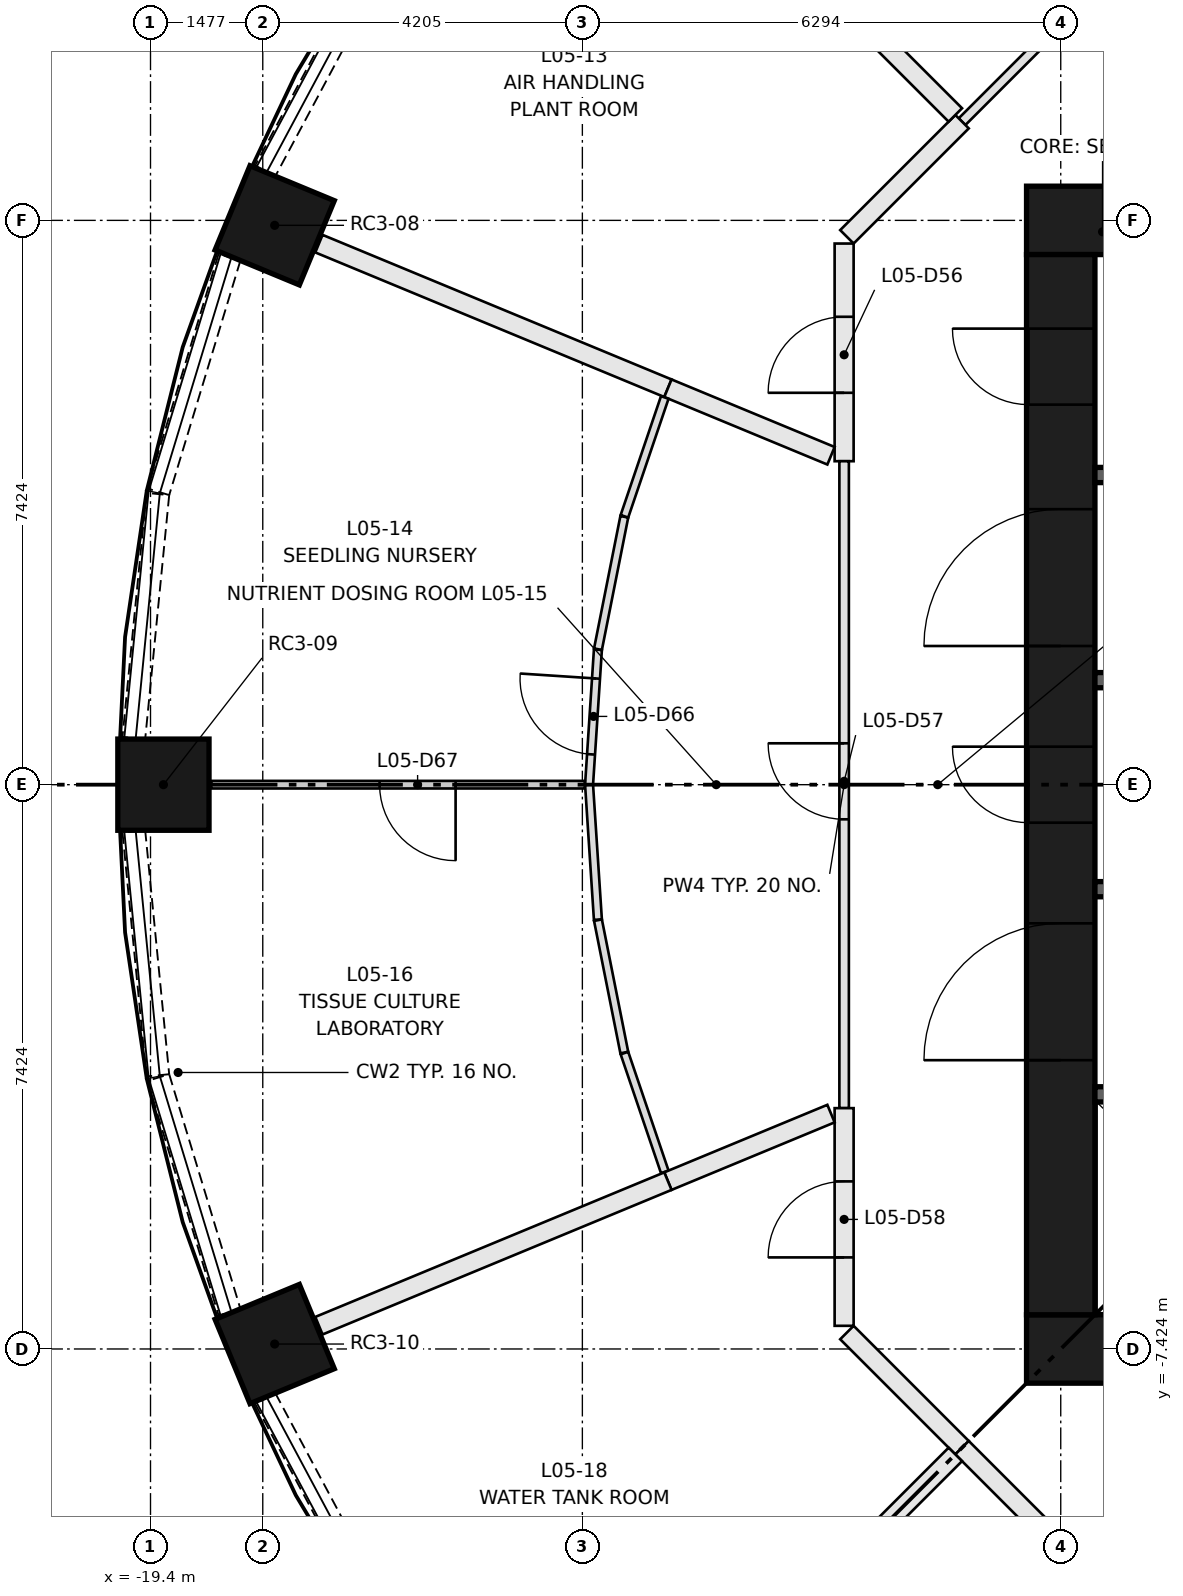
"""IFC4 building model, lengths in metres.
Left out: names, types, materials, properties, quantities, classifications, styles, units other than length and angle.
Written with IfcOpenShell. Run it as: python <this file> out.ifc"""

import sys

from ifc_helpers import new_model, si_unit, direction, frame, frame_2d, origin, origin_2d, place, context, subcontext, project, spatial, rectangle, extrude, element, fill, save


model = new_model("IFC4")
c1 = context("Model", 3, precision=1e-05, world=origin(), true_north=direction((0.0, 1.0)))
c2 = subcontext(c1, "Body", "Model", "MODEL_VIEW")
j1 = project(units=[si_unit("LENGTHUNIT", "METRE"), si_unit("PLANEANGLEUNIT", "RADIAN")], contexts=[c1])
p1 = place(None, origin())
s1 = spatial("IfcSite", under=j1, at=p1, CompositionType="ELEMENT")
p2 = place(p1, origin())
s2 = spatial("IfcBuilding", under=s1, at=p2, CompositionType="ELEMENT")
p3 = place(p2, frame((0.0, 0.0, 22.4)))
s3 = spatial("IfcBuildingStorey", under=s2, at=p3, CompositionType="ELEMENT", Elevation=22.4)
for number, where, z_axis, x_axis in (
    (1, (-17.766, 7.359, 0.0), (0.0, 0.0, 1.0), (-0.924, 0.383, 0.0)),
    (2, (-19.23, 0.0, 0.0), (0.0, 0.0, 1.0), (-1.0, 0.0, 0.0)),
    (3, (-17.766, -7.359, 0.0), (0.0, 0.0, 1.0), (-0.924, -0.383, 0.0)),
):
    element("IfcColumn", number, at=place(p3, frame(where, z_axis=z_axis, x_axis=x_axis)), inside=s3, PredefinedType="COLUMN", context=c2, shape_type="SweptSolid", body=[
        extrude(rectangle(XDim=1.2, YDim=1.2, at=origin_2d()), origin(), (0.0, 0.0, 1.0), 3.8),
    ])
for number, where, z_axis, x_axis in (
    (4, (-7.874, -7.424, 0.0), (0.0, 0.0, 1.0), (1.0, 0.0, 0.0)),
    (5, (-7.874, 7.424, 0.0), (0.0, 0.0, 1.0), (1.0, 0.0, 0.0)),
):
    element("IfcWall", number, at=place(p3, frame(where, z_axis=z_axis, x_axis=x_axis)), inside=s3, PredefinedType="SHEAR", context=c2, shape_type="SweptSolid", body=[
        extrude(rectangle(XDim=15.748, YDim=0.9, at=frame_2d((7.874, 0.0))), origin(), (0.0, 0.0, 1.0), 3.8),
    ])
p4 = place(p3, frame((-7.424, -6.974, 0.0), z_axis=(0.0, 0.0, 1.0), x_axis=(0.0, 1.0, 0.0)))
e6 = element("IfcWall", 6, at=p4, inside=s3, PredefinedType="SHEAR", context=c2, shape_type="SweptSolid", body=[
    extrude(rectangle(XDim=13.948, YDim=0.9, at=frame_2d((6.974, 0.0))), origin(), (0.0, 0.0, 1.0), 3.8),
])
p5 = place(p4, frame((6.474, 0.0, 0.0)))
e7 = element("IfcOpeningElement", 7, at=p5, cuts=e6, PredefinedType="OPENING", context=c2, shape_type="SweptSolid", body=[
    extrude(rectangle(XDim=1.0, YDim=2.1, at=frame_2d((0.5, 1.05))), frame((0.0, 0.46, 0.0), z_axis=(0.0, -1.0, 0.0), x_axis=(1.0, 0.0, 0.0)), (0.0, 0.0, 1.0), 0.92),
])
p6 = place(p4, frame((3.35, 0.0, 0.0)))
e8 = element("IfcOpeningElement", 8, at=p6, cuts=e6, PredefinedType="OPENING", context=c2, shape_type="SweptSolid", body=[
    extrude(rectangle(XDim=1.8, YDim=2.1, at=frame_2d((0.9, 1.05))), frame((0.0, 0.46, 0.0), z_axis=(0.0, -1.0, 0.0), x_axis=(1.0, 0.0, 0.0)), (0.0, 0.0, 1.0), 0.92),
])
p7 = place(p4, frame((8.799, 0.0, 0.0)))
e9 = element("IfcOpeningElement", 9, at=p7, cuts=e6, PredefinedType="OPENING", context=c2, shape_type="SweptSolid", body=[
    extrude(rectangle(XDim=1.8, YDim=2.1, at=frame_2d((0.9, 1.05))), frame((0.0, 0.46, 0.0), z_axis=(0.0, -1.0, 0.0), x_axis=(1.0, 0.0, 0.0)), (0.0, 0.0, 1.0), 0.92),
])
p8 = place(p4, frame((11.974, 0.0, 0.0)))
e10 = element("IfcOpeningElement", 10, at=p8, cuts=e6, PredefinedType="OPENING", context=c2, shape_type="SweptSolid", body=[
    extrude(rectangle(XDim=1.0, YDim=2.1, at=frame_2d((0.5, 1.05))), frame((0.0, 0.46, 0.0), z_axis=(0.0, -1.0, 0.0), x_axis=(1.0, 0.0, 0.0)), (0.0, 0.0, 1.0), 0.92),
])
p9 = place(p3, frame((-6.974, -4.074, 0.0), z_axis=(0.0, 0.0, 1.0), x_axis=(1.0, 0.0, 0.0)))
e11 = element("IfcWall", 11, at=p9, inside=s3, PredefinedType="SHEAR", context=c2, shape_type="SweptSolid", body=[
    extrude(rectangle(XDim=13.948, YDim=0.2, at=frame_2d((6.974, 0.0))), origin(), (0.0, 0.0, 1.0), 3.45),
])
p10 = place(p9, frame((0.918, 0.0, 0.0)))
e12 = element("IfcOpeningElement", 12, at=p10, cuts=e11, PredefinedType="OPENING", context=c2, shape_type="SweptSolid", body=[
    extrude(rectangle(XDim=1.1, YDim=2.1, at=frame_2d((0.55, 1.05))), frame((0.0, 0.11, 0.0), z_axis=(0.0, -1.0, 0.0), x_axis=(1.0, 0.0, 0.0)), (0.0, 0.0, 1.0), 0.22),
])
p11 = place(p9, frame((4.055, 0.0, 0.0)))
e13 = element("IfcOpeningElement", 13, at=p11, cuts=e11, PredefinedType="OPENING", context=c2, shape_type="SweptSolid", body=[
    extrude(rectangle(XDim=1.1, YDim=2.1, at=frame_2d((0.55, 1.05))), frame((0.0, 0.11, 0.0), z_axis=(0.0, -1.0, 0.0), x_axis=(1.0, 0.0, 0.0)), (0.0, 0.0, 1.0), 0.22),
])
p12 = place(p9, frame((6.658, 0.0, 0.0)))
e14 = element("IfcOpeningElement", 14, at=p12, cuts=e11, PredefinedType="OPENING", context=c2, shape_type="SweptSolid", body=[
    extrude(rectangle(XDim=1.0, YDim=2.1, at=frame_2d((0.5, 1.05))), frame((0.0, 0.11, 0.0), z_axis=(0.0, -1.0, 0.0), x_axis=(1.0, 0.0, 0.0)), (0.0, 0.0, 1.0), 0.22),
])
p13 = place(p9, frame((8.627, 0.0, 0.0)))
e15 = element("IfcOpeningElement", 15, at=p13, cuts=e11, PredefinedType="OPENING", context=c2, shape_type="SweptSolid", body=[
    extrude(rectangle(XDim=1.0, YDim=2.1, at=frame_2d((0.5, 1.05))), frame((0.0, 0.11, 0.0), z_axis=(0.0, -1.0, 0.0), x_axis=(1.0, 0.0, 0.0)), (0.0, 0.0, 1.0), 0.22),
])
p14 = place(p9, frame((10.595, 0.0, 0.0)))
e16 = element("IfcOpeningElement", 16, at=p14, cuts=e11, PredefinedType="OPENING", context=c2, shape_type="SweptSolid", body=[
    extrude(rectangle(XDim=1.0, YDim=2.1, at=frame_2d((0.5, 1.05))), frame((0.0, 0.11, 0.0), z_axis=(0.0, -1.0, 0.0), x_axis=(1.0, 0.0, 0.0)), (0.0, 0.0, 1.0), 0.22),
])
p15 = place(p9, frame((12.564, 0.0, 0.0)))
e17 = element("IfcOpeningElement", 17, at=p15, cuts=e11, PredefinedType="OPENING", context=c2, shape_type="SweptSolid", body=[
    extrude(rectangle(XDim=1.0, YDim=2.1, at=frame_2d((0.5, 1.05))), frame((0.0, 0.11, 0.0), z_axis=(0.0, -1.0, 0.0), x_axis=(1.0, 0.0, 0.0)), (0.0, 0.0, 1.0), 0.22),
])
p16 = place(p3, frame((-6.974, 4.074, 0.0), z_axis=(0.0, 0.0, 1.0), x_axis=(1.0, 0.0, 0.0)))
e18 = element("IfcWall", 18, at=p16, inside=s3, PredefinedType="SHEAR", context=c2, shape_type="SweptSolid", body=[
    extrude(rectangle(XDim=6.974, YDim=0.2, at=frame_2d((3.487, 0.0))), origin(), (0.0, 0.0, 1.0), 3.45),
])
for number, where, z_axis, x_axis in (
    (19, (-6.974, -1.375, 0.0), (0.0, 0.0, 1.0), (1.0, 0.0, 0.0)),
    (20, (-6.974, 1.375, 0.0), (0.0, 0.0, 1.0), (1.0, 0.0, 0.0)),
):
    element("IfcWall", number, at=place(p3, frame(where, z_axis=z_axis, x_axis=x_axis)), inside=s3, PredefinedType="SHEAR", context=c2, shape_type="SweptSolid", body=[
        extrude(rectangle(XDim=2.6, YDim=0.2, at=frame_2d((1.3, 0.0))), origin(), (0.0, 0.0, 1.0), 3.45),
    ])
p17 = place(p3, frame((-16.37, 10.92, 0.0), z_axis=(0.0, 0.0, 1.0), x_axis=(-0.471322475968, -0.881960953585, 0.0)))
e21 = element("IfcWall", 21, at=p17, inside=s3, PredefinedType="SOLIDWALL", context=c2, shape_type="SweptSolid", body=[
    extrude(rectangle(XDim=3.227, YDim=0.3, at=frame_2d((1.613, 0.0))), origin(), (0.0, 0.0, 1.0), 0.9),
])
p18 = place(p3, frame((-18.36, 6.941, 0.0), z_axis=(0.0, 0.0, 1.0), x_axis=(-0.290505111592, -0.95687343998, 0.0)))
e22 = element("IfcWall", 22, at=p18, inside=s3, PredefinedType="SOLIDWALL", context=c2, shape_type="SweptSolid", body=[
    extrude(rectangle(XDim=3.226, YDim=0.3, at=frame_2d((1.613, 0.0))), origin(), (0.0, 0.0, 1.0), 0.9),
])
for number, where, z_axis, x_axis in (
    (23, (-19.303, 3.824, 0.0), (0.0, 0.0, 1.0), (-0.098, -0.995, 0.0)),
    (24, (-19.619, -0.613, 0.0), (0.0, 0.0, 1.0), (0.098, -0.995, 0.0)),
):
    element("IfcWall", number, at=place(p3, frame(where, z_axis=z_axis, x_axis=x_axis)), inside=s3, PredefinedType="SOLIDWALL", context=c2, shape_type="SweptSolid", body=[
        extrude(rectangle(XDim=3.227, YDim=0.3, at=frame_2d((1.613, 0.0))), origin(), (0.0, 0.0, 1.0), 0.9),
    ])
p19 = place(p3, frame((-19.298, -3.854, 0.0), z_axis=(0.0, 0.0, 1.0), x_axis=(0.290505111592, -0.95687343998, 0.0)))
e25 = element("IfcWall", 25, at=p19, inside=s3, PredefinedType="SOLIDWALL", context=c2, shape_type="SweptSolid", body=[
    extrude(rectangle(XDim=3.226, YDim=0.3, at=frame_2d((1.613, 0.0))), origin(), (0.0, 0.0, 1.0), 0.9),
])
p20 = place(p3, frame((-17.891, -8.074, 0.0), z_axis=(0.0, 0.0, 1.0), x_axis=(0.471322475968, -0.881960953585, 0.0)))
e26 = element("IfcWall", 26, at=p20, inside=s3, PredefinedType="SOLIDWALL", context=c2, shape_type="SweptSolid", body=[
    extrude(rectangle(XDim=3.227, YDim=0.3, at=frame_2d((1.613, 0.0))), origin(), (0.0, 0.0, 1.0), 0.9),
])
p21 = place(p3, frame((-8.722, 8.722, 0.0), z_axis=(0.0, 0.0, 1.0), x_axis=(0.707050476152, 0.707163081738, 0.0)))
e27 = element("IfcWall", 27, at=p21, inside=s3, PredefinedType="PARTITIONING", context=c2, shape_type="SweptSolid", body=[
    extrude(rectangle(XDim=2.168, YDim=0.125, at=frame_2d((1.084, 0.0))), origin(), (0.0, 0.0, 1.0), 3.45),
])
p22 = place(p3, frame((-10.274, 4.256, 0.0), z_axis=(0.0, 0.0, 1.0), x_axis=(0.0, 1.0, 0.0)))
e28 = element("IfcWall", 28, at=p22, inside=s3, PredefinedType="PARTITIONING", context=c2, shape_type="SweptSolid", body=[
    extrude(rectangle(XDim=2.864, YDim=0.25, at=frame_2d((1.432, 0.0))), origin(), (0.0, 0.0, 1.0), 3.45),
])
p23 = place(p22, frame((0.9, 0.0, 0.0)))
e29 = element("IfcOpeningElement", 29, at=p23, cuts=e28, PredefinedType="OPENING", context=c2, shape_type="SweptSolid", body=[
    extrude(rectangle(XDim=1.0, YDim=2.1, at=frame_2d((0.5, 1.05))), frame((0.0, 0.135, 0.0), z_axis=(0.0, -1.0, 0.0), x_axis=(1.0, 0.0, 0.0)), (0.0, 0.0, 1.0), 0.27),
])
p24 = place(p3, frame((-10.237, 7.208, 0.0), z_axis=(0.0, 0.0, 1.0), x_axis=(0.707163762272, 0.707049795509, 0.0)))
e30 = element("IfcWall", 30, at=p24, inside=s3, PredefinedType="PARTITIONING", context=c2, shape_type="SweptSolid", body=[
    extrude(rectangle(XDim=2.142, YDim=0.25, at=frame_2d((1.071, 0.0))), origin(), (0.0, 0.0, 1.0), 3.45),
])
p25 = place(p3, frame((-10.274, -4.256, 0.0), z_axis=(0.0, 0.0, 1.0), x_axis=(0.0, 1.0, 0.0)))
e31 = element("IfcWall", 31, at=p25, inside=s3, PredefinedType="PARTITIONING", context=c2, shape_type="SweptSolid", body=[
    extrude(rectangle(XDim=8.511, YDim=0.125, at=frame_2d((4.256, 0.0))), origin(), (0.0, 0.0, 1.0), 3.45),
])
p26 = place(p25, frame((3.8, 0.0, 0.0)))
e32 = element("IfcOpeningElement", 32, at=p26, cuts=e31, PredefinedType="OPENING", context=c2, shape_type="SweptSolid", body=[
    extrude(rectangle(XDim=1.0, YDim=2.1, at=frame_2d((0.5, 1.05))), frame((0.0, 0.073, 0.0), z_axis=(0.0, -1.0, 0.0), x_axis=(1.0, 0.0, 0.0)), (0.0, 0.0, 1.0), 0.145),
])
p27 = place(p3, frame((-10.274, -7.119, 0.0), z_axis=(0.0, 0.0, 1.0), x_axis=(0.0, 1.0, 0.0)))
e33 = element("IfcWall", 33, at=p27, inside=s3, PredefinedType="PARTITIONING", context=c2, shape_type="SweptSolid", body=[
    extrude(rectangle(XDim=2.864, YDim=0.25, at=frame_2d((1.432, 0.0))), origin(), (0.0, 0.0, 1.0), 3.45),
])
p28 = place(p27, frame((0.9, 0.0, 0.0)))
e34 = element("IfcOpeningElement", 34, at=p28, cuts=e33, PredefinedType="OPENING", context=c2, shape_type="SweptSolid", body=[
    extrude(rectangle(XDim=1.0, YDim=2.1, at=frame_2d((0.5, 1.05))), frame((0.0, 0.135, 0.0), z_axis=(0.0, -1.0, 0.0), x_axis=(1.0, 0.0, 0.0)), (0.0, 0.0, 1.0), 0.27),
])
for number, where, z_axis, x_axis in (
    (35, (-8.722, -8.722, 0.0), (0.0, 0.0, 1.0), (-0.707, 0.707, 0.0)),
    (36, (-7.208, -10.237, 0.0), (0.0, 0.0, 1.0), (-0.707, 0.707, 0.0)),
):
    element("IfcWall", number, at=place(p3, frame(where, z_axis=z_axis, x_axis=x_axis)), inside=s3, PredefinedType="PARTITIONING", context=c2, shape_type="SweptSolid", body=[
        extrude(rectangle(XDim=2.142, YDim=0.25, at=frame_2d((1.071, 0.0))), origin(), (0.0, 0.0, 1.0), 3.45),
    ])
p29 = place(p3, frame((-8.811, 8.811, 0.0), z_axis=(0.0, 0.0, 1.0), x_axis=(-0.707106781187, 0.707106781187, 0.0)))
e37 = element("IfcWall", 37, at=p29, inside=s3, PredefinedType="PARTITIONING", context=c2, shape_type="SweptSolid", body=[
    extrude(rectangle(XDim=6.14, YDim=0.25, at=frame_2d((3.07, 0.0))), origin(), (0.0, 0.0, 1.0), 3.45),
])
p30 = place(p3, frame((-12.593, 5.216, 0.0), z_axis=(0.0, 0.0, 1.0), x_axis=(-0.923864152058, 0.382720561955, 0.0)))
e38 = element("IfcWall", 38, at=p30, inside=s3, PredefinedType="PARTITIONING", context=c2, shape_type="SweptSolid", body=[
    extrude(rectangle(XDim=4.97, YDim=0.25, at=frame_2d((2.485, 0.0))), origin(), (0.0, 0.0, 1.0), 3.45),
])
p31 = place(p3, frame((-10.447, 4.327, 0.0), z_axis=(0.0, 0.0, 1.0), x_axis=(-0.923898968867, 0.382636505481, 0.0)))
e39 = element("IfcWall", 39, at=p31, inside=s3, PredefinedType="PARTITIONING", context=c2, shape_type="SweptSolid", body=[
    extrude(rectangle(XDim=2.323, YDim=0.25, at=frame_2d((1.161, 0.0))), origin(), (0.0, 0.0, 1.0), 3.45),
])
p32 = place(p3, frame((-13.63, 0.0, 0.0), z_axis=(0.0, 0.0, 1.0), x_axis=(0.065307826017, 0.997865165171, 0.0)))
e40 = element("IfcWall", 40, at=p32, inside=s3, PredefinedType="PARTITIONING", context=c2, shape_type="SweptSolid", body=[
    extrude(rectangle(XDim=1.78, YDim=0.105, at=frame_2d((0.89, 0.0))), origin(), (0.0, 0.0, 1.0), 3.45),
])
p33 = place(p32, frame((0.4, 0.0, 0.0)))
e41 = element("IfcOpeningElement", 41, at=p33, cuts=e40, PredefinedType="OPENING", context=c2, shape_type="SweptSolid", body=[
    extrude(rectangle(XDim=1.0, YDim=2.1, at=frame_2d((0.5, 1.05))), frame((0.0, 0.062, 0.0), z_axis=(0.0, -1.0, 0.0), x_axis=(1.0, 0.0, 0.0)), (0.0, 0.0, 1.0), 0.125),
])
p34 = place(p3, frame((-13.166, 3.524, 0.0), z_axis=(0.0, 0.0, 1.0), x_axis=(-0.195058620882, -0.980791585618, 0.0)))
e42 = element("IfcWall", 42, at=p34, inside=s3, PredefinedType="PARTITIONING", context=c2, shape_type="SweptSolid", body=[
    extrude(rectangle(XDim=1.776, YDim=0.105, at=frame_2d((0.888, 0.0))), origin(), (0.0, 0.0, 1.0), 3.45),
])
p35 = place(p3, frame((-12.634, 5.094, 0.0), z_axis=(0.0, 0.0, 1.0), x_axis=(-0.321547397039, -0.946893484748, 0.0)))
e43 = element("IfcWall", 43, at=p35, inside=s3, PredefinedType="PARTITIONING", context=c2, shape_type="SweptSolid", body=[
    extrude(rectangle(XDim=1.651, YDim=0.105, at=frame_2d((0.825, 0.0))), origin(), (0.0, 0.0, 1.0), 3.45),
])
p36 = place(p3, frame((-13.686, 0.0, 0.0), z_axis=(0.0, 0.0, 1.0), x_axis=(-1.0, 0.0, 0.0)))
e44 = element("IfcWall", 44, at=p36, inside=s3, PredefinedType="PARTITIONING", context=c2, shape_type="SweptSolid", body=[
    extrude(rectangle(XDim=4.914, YDim=0.1, at=frame_2d((2.457, 0.0))), origin(), (0.0, 0.0, 1.0), 3.45),
])
p37 = place(p36, frame((1.7, 0.0, 0.0)))
e45 = element("IfcOpeningElement", 45, at=p37, cuts=e44, PredefinedType="OPENING", context=c2, shape_type="SweptSolid", body=[
    extrude(rectangle(XDim=1.0, YDim=2.1, at=frame_2d((0.5, 1.05))), frame((0.0, 0.06, 0.0), z_axis=(0.0, -1.0, 0.0), x_axis=(1.0, 0.0, 0.0)), (0.0, 0.0, 1.0), 0.12),
])
p38 = place(p3, frame((-13.514, -1.776, 0.0), z_axis=(0.0, 0.0, 1.0), x_axis=(-0.065307826017, 0.997865165171, 0.0)))
e46 = element("IfcWall", 46, at=p38, inside=s3, PredefinedType="PARTITIONING", context=c2, shape_type="SweptSolid", body=[
    extrude(rectangle(XDim=1.78, YDim=0.105, at=frame_2d((0.89, 0.0))), origin(), (0.0, 0.0, 1.0), 3.45),
])
p39 = place(p3, frame((-13.166, -3.524, 0.0), z_axis=(0.0, 0.0, 1.0), x_axis=(-0.195058620882, 0.980791585618, 0.0)))
e47 = element("IfcWall", 47, at=p39, inside=s3, PredefinedType="PARTITIONING", context=c2, shape_type="SweptSolid", body=[
    extrude(rectangle(XDim=1.776, YDim=0.105, at=frame_2d((0.888, 0.0))), origin(), (0.0, 0.0, 1.0), 3.45),
])
p40 = place(p3, frame((-12.634, -5.094, 0.0), z_axis=(0.0, 0.0, 1.0), x_axis=(-0.321547397039, 0.946893484748, 0.0)))
e48 = element("IfcWall", 48, at=p40, inside=s3, PredefinedType="PARTITIONING", context=c2, shape_type="SweptSolid", body=[
    extrude(rectangle(XDim=1.651, YDim=0.105, at=frame_2d((0.825, 0.0))), origin(), (0.0, 0.0, 1.0), 3.45),
])
p41 = place(p3, frame((-10.447, -4.327, 0.0), z_axis=(0.0, 0.0, 1.0), x_axis=(-0.923898968867, -0.382636505481, 0.0)))
e49 = element("IfcWall", 49, at=p41, inside=s3, PredefinedType="PARTITIONING", context=c2, shape_type="SweptSolid", body=[
    extrude(rectangle(XDim=2.323, YDim=0.25, at=frame_2d((1.161, 0.0))), origin(), (0.0, 0.0, 1.0), 3.45),
])
p42 = place(p3, frame((-12.593, -5.216, 0.0), z_axis=(0.0, 0.0, 1.0), x_axis=(-0.92388152058, -0.382678632707, 0.0)))
e50 = element("IfcWall", 50, at=p42, inside=s3, PredefinedType="PARTITIONING", context=c2, shape_type="SweptSolid", body=[
    extrude(rectangle(XDim=4.97, YDim=0.25, at=frame_2d((2.485, 0.0))), origin(), (0.0, 0.0, 1.0), 3.45),
])
p43 = place(p3, frame((-13.152, -13.152, 0.0), z_axis=(0.0, 0.0, 1.0), x_axis=(0.707106781187, 0.707106781187, 0.0)))
e51 = element("IfcWall", 51, at=p43, inside=s3, PredefinedType="PARTITIONING", context=c2, shape_type="SweptSolid", body=[
    extrude(rectangle(XDim=6.14, YDim=0.25, at=frame_2d((3.07, 0.0))), origin(), (0.0, 0.0, 1.0), 3.45),
])
p44 = place(p5, origin())
e52 = element("IfcDoor", 52, at=p44, inside=s3, OperationType="SINGLE_SWING_RIGHT", PredefinedType="DOOR", context=c2, shape_type="SweptSolid", body=[
    extrude(rectangle(XDim=1.0, YDim=2.1, at=frame_2d((0.5, 1.05))), frame((0.0, 0.45, 0.0), z_axis=(0.0, -1.0, 0.0), x_axis=(1.0, 0.0, 0.0)), (0.0, 0.0, 1.0), 0.05),
])
fill(e7, e52)
p45 = place(p6, origin())
e53 = element("IfcDoor", 53, at=p45, inside=s3, OperationType="DOUBLE_DOOR_SINGLE_SWING", PredefinedType="DOOR", context=c2, shape_type="SweptSolid", body=[
    extrude(rectangle(XDim=1.8, YDim=2.1, at=frame_2d((0.9, 1.05))), frame((0.0, 0.025, 0.0), z_axis=(0.0, -1.0, 0.0), x_axis=(1.0, 0.0, 0.0)), (0.0, 0.0, 1.0), 0.05),
])
fill(e8, e53)
p46 = place(p7, origin())
e54 = element("IfcDoor", 54, at=p46, inside=s3, OperationType="DOUBLE_DOOR_SINGLE_SWING", PredefinedType="DOOR", context=c2, shape_type="SweptSolid", body=[
    extrude(rectangle(XDim=1.8, YDim=2.1, at=frame_2d((0.9, 1.05))), frame((0.0, 0.025, 0.0), z_axis=(0.0, -1.0, 0.0), x_axis=(1.0, 0.0, 0.0)), (0.0, 0.0, 1.0), 0.05),
])
fill(e9, e54)
p47 = place(p8, origin())
e55 = element("IfcDoor", 55, at=p47, inside=s3, OperationType="SINGLE_SWING_RIGHT", PredefinedType="DOOR", context=c2, shape_type="SweptSolid", body=[
    extrude(rectangle(XDim=1.0, YDim=2.1, at=frame_2d((0.5, 1.05))), frame((0.0, 0.45, 0.0), z_axis=(0.0, -1.0, 0.0), x_axis=(1.0, 0.0, 0.0)), (0.0, 0.0, 1.0), 0.05),
])
fill(e10, e55)
p48 = place(p23, origin())
e56 = element("IfcDoor", 56, at=p48, inside=s3, OperationType="SINGLE_SWING_LEFT", PredefinedType="DOOR", context=c2, shape_type="SweptSolid", body=[
    extrude(rectangle(XDim=1.0, YDim=2.1, at=frame_2d((0.5, 1.05))), frame((0.0, 0.025, 0.0), z_axis=(0.0, -1.0, 0.0), x_axis=(1.0, 0.0, 0.0)), (0.0, 0.0, 1.0), 0.05),
])
fill(e29, e56)
p49 = place(p26, origin())
e57 = element("IfcDoor", 57, at=p49, inside=s3, OperationType="SINGLE_SWING_RIGHT", PredefinedType="DOOR", context=c2, shape_type="SweptSolid", body=[
    extrude(rectangle(XDim=1.0, YDim=2.1, at=frame_2d((0.5, 1.05))), frame((0.0, 0.025, 0.0), z_axis=(0.0, -1.0, 0.0), x_axis=(1.0, 0.0, 0.0)), (0.0, 0.0, 1.0), 0.05),
])
fill(e32, e57)
p50 = place(p28, origin())
e58 = element("IfcDoor", 58, at=p50, inside=s3, OperationType="SINGLE_SWING_LEFT", PredefinedType="DOOR", context=c2, shape_type="SweptSolid", body=[
    extrude(rectangle(XDim=1.0, YDim=2.1, at=frame_2d((0.5, 1.05))), frame((0.0, 0.025, 0.0), z_axis=(0.0, -1.0, 0.0), x_axis=(1.0, 0.0, 0.0)), (0.0, 0.0, 1.0), 0.05),
])
fill(e34, e58)
p51 = place(p33, origin())
e59 = element("IfcDoor", 59, at=p51, inside=s3, OperationType="SINGLE_SWING_RIGHT", PredefinedType="DOOR", context=c2, shape_type="SweptSolid", body=[
    extrude(rectangle(XDim=1.0, YDim=2.1, at=frame_2d((0.5, 1.05))), frame((0.0, 0.025, 0.0), z_axis=(0.0, -1.0, 0.0), x_axis=(1.0, 0.0, 0.0)), (0.0, 0.0, 1.0), 0.05),
])
fill(e41, e59)
p52 = place(p37, origin())
e60 = element("IfcDoor", 60, at=p52, inside=s3, OperationType="SINGLE_SWING_LEFT", PredefinedType="DOOR", context=c2, shape_type="SweptSolid", body=[
    extrude(rectangle(XDim=1.0, YDim=2.1, at=frame_2d((0.5, 1.05))), frame((0.0, 0.025, 0.0), z_axis=(0.0, -1.0, 0.0), x_axis=(1.0, 0.0, 0.0)), (0.0, 0.0, 1.0), 0.05),
])
fill(e45, e60)
save(model, sys.argv[1])
